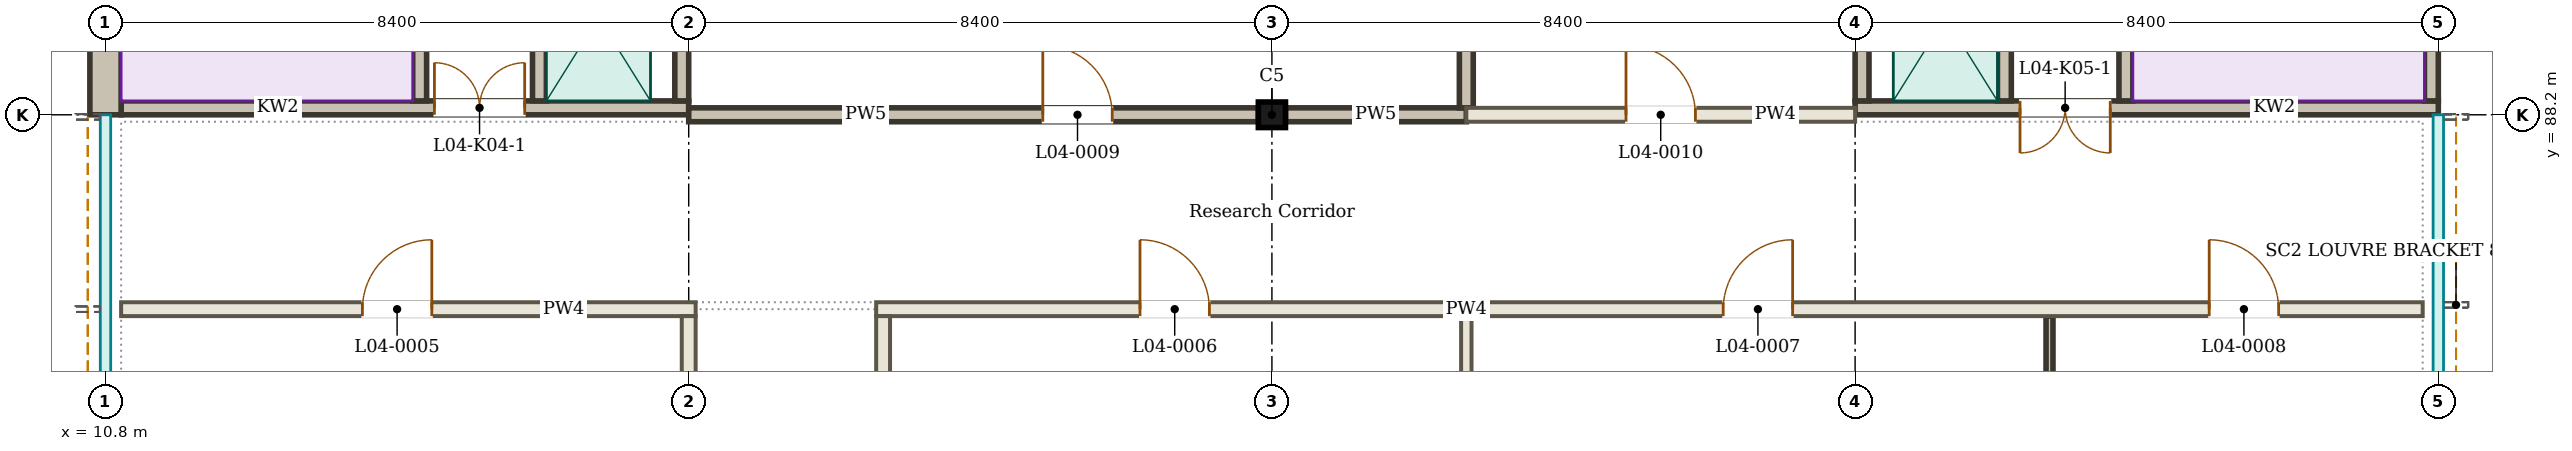
"""IFC4 building model, lengths in metres.
Left out: names, types, materials, properties, quantities, classifications, styles, units other than length and angle.
Written with IfcOpenShell. Run it as: python <this file> out.ifc"""

import sys

from ifc_helpers import new_model, si_unit, direction, frame, frame_2d, origin, origin_2d, place, context, subcontext, project, spatial, rectangle, i_section, extrude, element, fill, save


model = new_model("IFC4")
c1 = context("Model", 3, precision=1e-05, world=origin(), true_north=direction((0.0, 1.0)))
c2 = subcontext(c1, "Body", "Model", "MODEL_VIEW")
j1 = project(units=[si_unit("LENGTHUNIT", "METRE"), si_unit("PLANEANGLEUNIT", "RADIAN")], contexts=[c1])
p1 = place(None, origin())
s1 = spatial("IfcSite", under=j1, at=p1, CompositionType="ELEMENT")
p2 = place(p1, origin())
s2 = spatial("IfcBuilding", under=s1, at=p2, CompositionType="ELEMENT")
p3 = place(p2, frame((0.0, 0.0, 18.0)))
s3 = spatial("IfcBuildingStorey", under=s2, at=p3, CompositionType="ELEMENT", Elevation=18.0)
p4 = place(p3, frame((27.6, 88.2, 0.0), z_axis=(0.0, 0.0, 1.0), x_axis=(1.0, 0.0, 0.0)))
e1 = element("IfcColumn", 1, at=p4, inside=s3, PredefinedType="COLUMN", context=c2, shape_type="SweptSolid", body=[
    extrude(i_section(OverallWidth=0.391, OverallDepth=0.368, WebThickness=0.015, FlangeThickness=0.024, FilletRadius=0.027, at=origin_2d()), origin(), (0.0, 0.0, 1.0), 4.5),
])
p5 = place(p3, frame((11.025, 85.4, 0.0), z_axis=(0.0, 0.0, 1.0), x_axis=(1.0, 0.0, 0.0)))
e2 = element("IfcWall", 2, at=p5, inside=s3, PredefinedType="PARTITIONING", context=c2, shape_type="SweptSolid", body=[
    extrude(rectangle(XDim=8.275, YDim=0.2, at=frame_2d((4.138, 0.0))), origin(), (0.0, 0.0, 1.0), 3.9),
])
p6 = place(p5, frame((3.475, 0.0, 0.0)))
e3 = element("IfcOpeningElement", 3, at=p6, cuts=e2, PredefinedType="OPENING", context=c2, shape_type="SweptSolid", body=[
    extrude(rectangle(XDim=1.0, YDim=2.1, at=frame_2d((0.5, 1.05))), frame((0.0, 0.11, 0.0), z_axis=(0.0, -1.0, 0.0), x_axis=(1.0, 0.0, 0.0)), (0.0, 0.0, 1.0), 0.22),
])
p7 = place(p3, frame((21.9, 85.4, 0.0), z_axis=(0.0, 0.0, 1.0), x_axis=(1.0, 0.0, 0.0)))
e4 = element("IfcWall", 4, at=p7, inside=s3, PredefinedType="PARTITIONING", context=c2, shape_type="SweptSolid", body=[
    extrude(rectangle(XDim=22.275, YDim=0.2, at=frame_2d((11.138, 0.0))), origin(), (0.0, 0.0, 1.0), 3.9),
])
p8 = place(p7, frame((3.8, 0.0, 0.0)))
e5 = element("IfcOpeningElement", 5, at=p8, cuts=e4, PredefinedType="OPENING", context=c2, shape_type="SweptSolid", body=[
    extrude(rectangle(XDim=1.0, YDim=2.1, at=frame_2d((0.5, 1.05))), frame((0.0, 0.11, 0.0), z_axis=(0.0, -1.0, 0.0), x_axis=(1.0, 0.0, 0.0)), (0.0, 0.0, 1.0), 0.22),
])
p9 = place(p7, frame((12.2, 0.0, 0.0)))
e6 = element("IfcOpeningElement", 6, at=p9, cuts=e4, PredefinedType="OPENING", context=c2, shape_type="SweptSolid", body=[
    extrude(rectangle(XDim=1.0, YDim=2.1, at=frame_2d((0.5, 1.05))), frame((0.0, 0.11, 0.0), z_axis=(0.0, -1.0, 0.0), x_axis=(1.0, 0.0, 0.0)), (0.0, 0.0, 1.0), 0.22),
])
p10 = place(p7, frame((19.2, 0.0, 0.0)))
e7 = element("IfcOpeningElement", 7, at=p10, cuts=e4, PredefinedType="OPENING", context=c2, shape_type="SweptSolid", body=[
    extrude(rectangle(XDim=1.0, YDim=2.1, at=frame_2d((0.5, 1.05))), frame((0.0, 0.11, 0.0), z_axis=(0.0, -1.0, 0.0), x_axis=(1.0, 0.0, 0.0)), (0.0, 0.0, 1.0), 0.22),
])
p11 = place(p3, frame((19.2, 88.2, 0.0), z_axis=(0.0, 0.0, 1.0), x_axis=(1.0, 0.0, 0.0)))
e8 = element("IfcWall", 8, at=p11, inside=s3, PredefinedType="SOLIDWALL", context=c2, shape_type="SweptSolid", body=[
    extrude(rectangle(XDim=8.205, YDim=0.2, at=frame_2d((4.102, 0.0))), origin(), (0.0, 0.0, 1.0), 3.9),
])
p12 = place(p11, frame((5.1, 0.0, 0.0)))
e9 = element("IfcOpeningElement", 9, at=p12, cuts=e8, PredefinedType="OPENING", context=c2, shape_type="SweptSolid", body=[
    extrude(rectangle(XDim=1.0, YDim=2.1, at=frame_2d((0.5, 1.05))), frame((0.0, 0.11, 0.0), z_axis=(0.0, -1.0, 0.0), x_axis=(1.0, 0.0, 0.0)), (0.0, 0.0, 1.0), 0.22),
])
p13 = place(p3, frame((27.795, 88.2, 0.0), z_axis=(0.0, 0.0, 1.0), x_axis=(1.0, 0.0, 0.0)))
e10 = element("IfcWall", 10, at=p13, inside=s3, PredefinedType="SOLIDWALL", context=c2, shape_type="SweptSolid", body=[
    extrude(rectangle(XDim=2.604, YDim=0.2, at=frame_2d((1.302, 0.0))), origin(), (0.0, 0.0, 1.0), 3.9),
])
p14 = place(p3, frame((30.4, 88.2, 0.0), z_axis=(0.0, 0.0, 1.0), x_axis=(1.0, 0.0, 0.0)))
e11 = element("IfcWall", 11, at=p14, inside=s3, PredefinedType="PARTITIONING", context=c2, shape_type="SweptSolid", body=[
    extrude(rectangle(XDim=5.6, YDim=0.2, at=frame_2d((2.8, 0.0))), origin(), (0.0, 0.0, 1.0), 3.9),
])
p15 = place(p14, frame((2.3, 0.0, 0.0)))
e12 = element("IfcOpeningElement", 12, at=p15, cuts=e11, PredefinedType="OPENING", context=c2, shape_type="SweptSolid", body=[
    extrude(rectangle(XDim=1.0, YDim=2.1, at=frame_2d((0.5, 1.05))), frame((0.0, 0.11, 0.0), z_axis=(0.0, -1.0, 0.0), x_axis=(1.0, 0.0, 0.0)), (0.0, 0.0, 1.0), 0.22),
])
p16 = place(p3, frame((19.2, 82.7, 0.0), z_axis=(0.0, 0.0, 1.0), x_axis=(0.0, 1.0, 0.0)))
e13 = element("IfcWall", 13, at=p16, inside=s3, PredefinedType="PARTITIONING", context=c2, shape_type="SweptSolid", body=[
    extrude(rectangle(XDim=2.6, YDim=0.2, at=frame_2d((1.3, 0.0))), origin(), (0.0, 0.0, 1.0), 3.9),
])
p17 = place(p3, frame((22.0, 79.875, 0.0), z_axis=(0.0, 0.0, 1.0), x_axis=(0.0, 1.0, 0.0)))
e14 = element("IfcWall", 14, at=p17, inside=s3, PredefinedType="PARTITIONING", context=c2, shape_type="SweptSolid", body=[
    extrude(rectangle(XDim=5.425, YDim=0.2, at=frame_2d((2.712, 0.0))), origin(), (0.0, 0.0, 1.0), 3.9),
])
p18 = place(p3, frame((30.4, 79.875, 0.0), z_axis=(0.0, 0.0, 1.0), x_axis=(0.0, 1.0, 0.0)))
e15 = element("IfcWall", 15, at=p18, inside=s3, PredefinedType="PARTITIONING", context=c2, shape_type="SweptSolid", body=[
    extrude(rectangle(XDim=5.425, YDim=0.15, at=frame_2d((2.712, 0.0))), origin(), (0.0, 0.0, 1.0), 3.9),
])
p19 = place(p3, frame((30.4, 88.3, 0.0), z_axis=(0.0, 0.0, 1.0), x_axis=(0.0, 1.0, 0.0)))
e16 = element("IfcWall", 16, at=p19, inside=s3, PredefinedType="SOLIDWALL", context=c2, shape_type="SweptSolid", body=[
    extrude(rectangle(XDim=8.075, YDim=0.2, at=frame_2d((4.038, 0.0))), origin(), (0.0, 0.0, 1.0), 3.996),
])
p20 = place(p3, frame((38.8, 79.875, 0.0), z_axis=(0.0, 0.0, 1.0), x_axis=(0.0, 1.0, 0.0)))
e17 = element("IfcWall", 17, at=p20, inside=s3, PredefinedType="SOLIDWALL", context=c2, shape_type="SweptSolid", body=[
    extrude(rectangle(XDim=5.425, YDim=0.1, at=frame_2d((2.712, 0.0))), origin(), (0.0, 0.0, 1.0), 3.9),
])
p21 = place(p3, frame((11.025, 88.3, 0.0), z_axis=(0.0, 0.0, 1.0), x_axis=(1.0, 0.0, 0.0)))
e18 = element("IfcWall", 18, at=p21, inside=s3, PredefinedType="SOLIDWALL", context=c2, shape_type="SweptSolid", body=[
    extrude(rectangle(XDim=8.175, YDim=0.2, at=frame_2d((4.087, 0.0))), origin(), (0.0, 0.0, 1.0), 4.5),
])
p22 = place(p21, frame((4.512, 0.0, 0.0)))
e19 = element("IfcOpeningElement", 19, at=p22, cuts=e18, PredefinedType="OPENING", context=c2, shape_type="SweptSolid", body=[
    extrude(rectangle(XDim=1.3, YDim=2.1, at=frame_2d((0.65, 1.05))), frame((0.0, 0.11, 0.0), z_axis=(0.0, -1.0, 0.0), x_axis=(1.0, 0.0, 0.0)), (0.0, 0.0, 1.0), 0.22),
])
p23 = place(p3, frame((10.8, 88.2, 0.0), z_axis=(0.0, 0.0, 1.0), x_axis=(0.0, 1.0, 0.0)))
e20 = element("IfcWall", 20, at=p23, inside=s3, PredefinedType="SOLIDWALL", context=c2, shape_type="SweptSolid", body=[
    extrude(rectangle(XDim=8.175, YDim=0.45, at=frame_2d((4.087, 0.0))), origin(), (0.0, 0.0, 1.0), 4.5),
])
p24 = place(p3, frame((19.1, 88.4, 0.0), z_axis=(0.0, 0.0, 1.0), x_axis=(0.0, 1.0, 0.0)))
e21 = element("IfcWall", 21, at=p24, inside=s3, PredefinedType="SOLIDWALL", context=c2, shape_type="SweptSolid", body=[
    extrude(rectangle(XDim=7.975, YDim=0.2, at=frame_2d((3.988, 0.0))), origin(), (0.0, 0.0, 1.0), 4.5),
])
p25 = place(p3, frame((15.325, 88.4, 0.0), z_axis=(0.0, 0.0, 1.0), x_axis=(0.0, 1.0, 0.0)))
e22 = element("IfcWall", 22, at=p25, inside=s3, PredefinedType="SOLIDWALL", context=c2, shape_type="SweptSolid", body=[
    extrude(rectangle(XDim=7.975, YDim=0.2, at=frame_2d((3.988, 0.0))), origin(), (0.0, 0.0, 1.0), 4.5),
])
p26 = place(p25, frame((6.538, 0.0, 0.0)))
e23 = element("IfcOpeningElement", 23, at=p26, cuts=e22, PredefinedType="OPENING", context=c2, shape_type="SweptSolid", body=[
    extrude(rectangle(XDim=1.1, YDim=2.1, at=frame_2d((0.55, 1.05))), frame((0.0, 0.11, 0.0), z_axis=(0.0, -1.0, 0.0), x_axis=(1.0, 0.0, 0.0)), (0.0, 0.0, 1.0), 0.22),
])
p27 = place(p3, frame((17.05, 88.4, 0.0), z_axis=(0.0, 0.0, 1.0), x_axis=(0.0, 1.0, 0.0)))
e24 = element("IfcWall", 24, at=p27, inside=s3, PredefinedType="SOLIDWALL", context=c2, shape_type="SweptSolid", body=[
    extrude(rectangle(XDim=2.95, YDim=0.2, at=frame_2d((1.475, 0.0))), origin(), (0.0, 0.0, 1.0), 4.5),
])
p28 = place(p3, frame((44.4, 88.3, 0.0), z_axis=(0.0, 0.0, 1.0), x_axis=(-1.0, 0.0, 0.0)))
e25 = element("IfcWall", 25, at=p28, inside=s3, PredefinedType="SOLIDWALL", context=c2, shape_type="SweptSolid", body=[
    extrude(rectangle(XDim=8.4, YDim=0.2, at=frame_2d((4.2, 0.0))), origin(), (0.0, 0.0, 1.0), 4.5),
])
p29 = place(p28, frame((4.725, 0.0, 0.0)))
e26 = element("IfcOpeningElement", 26, at=p29, cuts=e25, PredefinedType="OPENING", context=c2, shape_type="SweptSolid", body=[
    extrude(rectangle(XDim=1.3, YDim=2.1, at=frame_2d((0.65, 1.05))), frame((0.0, 0.11, 0.0), z_axis=(0.0, -1.0, 0.0), x_axis=(1.0, 0.0, 0.0)), (0.0, 0.0, 1.0), 0.22),
])
for number, where, z_axis, x_axis in (
    (27, (44.3, 88.4, 0.0), (0.0, 0.0, 1.0), (0.0, 1.0, 0.0)),
    (28, (36.1, 88.4, 0.0), (0.0, 0.0, 1.0), (0.0, 1.0, 0.0)),
):
    element("IfcWall", number, at=place(p3, frame(where, z_axis=z_axis, x_axis=x_axis)), inside=s3, PredefinedType="SOLIDWALL", context=c2, shape_type="SweptSolid", body=[
        extrude(rectangle(XDim=7.975, YDim=0.2, at=frame_2d((3.988, 0.0))), origin(), (0.0, 0.0, 1.0), 4.5),
    ])
p30 = place(p3, frame((39.9, 88.4, 0.0), z_axis=(0.0, 0.0, 1.0), x_axis=(0.0, 1.0, 0.0)))
e29 = element("IfcWall", 29, at=p30, inside=s3, PredefinedType="SOLIDWALL", context=c2, shape_type="SweptSolid", body=[
    extrude(rectangle(XDim=7.975, YDim=0.2, at=frame_2d((3.988, 0.0))), origin(), (0.0, 0.0, 1.0), 4.5),
])
p31 = place(p30, frame((6.538, 0.0, 0.0)))
e30 = element("IfcOpeningElement", 30, at=p31, cuts=e29, PredefinedType="OPENING", context=c2, shape_type="SweptSolid", body=[
    extrude(rectangle(XDim=1.1, YDim=2.1, at=frame_2d((0.55, 1.05))), frame((0.0, 0.11, 0.0), z_axis=(0.0, -1.0, 0.0), x_axis=(1.0, 0.0, 0.0)), (0.0, 0.0, 1.0), 0.22),
])
p32 = place(p3, frame((38.15, 88.4, 0.0), z_axis=(0.0, 0.0, 1.0), x_axis=(0.0, 1.0, 0.0)))
e31 = element("IfcWall", 31, at=p32, inside=s3, PredefinedType="SOLIDWALL", context=c2, shape_type="SweptSolid", body=[
    extrude(rectangle(XDim=2.95, YDim=0.2, at=frame_2d((1.475, 0.0))), origin(), (0.0, 0.0, 1.0), 4.5),
])
p33 = place(p6, origin())
e32 = element("IfcDoor", 32, at=p33, inside=s3, OperationType="SINGLE_SWING_RIGHT", PredefinedType="DOOR", context=c2, shape_type="SweptSolid", body=[
    extrude(rectangle(XDim=1.0, YDim=2.1, at=frame_2d((0.5, 1.05))), frame((0.0, 0.025, 0.0), z_axis=(0.0, -1.0, 0.0), x_axis=(1.0, 0.0, 0.0)), (0.0, 0.0, 1.0), 0.05),
])
fill(e3, e32)
p34 = place(p8, origin())
e33 = element("IfcDoor", 33, at=p34, inside=s3, OperationType="SINGLE_SWING_LEFT", PredefinedType="DOOR", context=c2, shape_type="SweptSolid", body=[
    extrude(rectangle(XDim=1.0, YDim=2.1, at=frame_2d((0.5, 1.05))), frame((0.0, 0.025, 0.0), z_axis=(0.0, -1.0, 0.0), x_axis=(1.0, 0.0, 0.0)), (0.0, 0.0, 1.0), 0.05),
])
fill(e5, e33)
p35 = place(p9, origin())
e34 = element("IfcDoor", 34, at=p35, inside=s3, OperationType="SINGLE_SWING_RIGHT", PredefinedType="DOOR", context=c2, shape_type="SweptSolid", body=[
    extrude(rectangle(XDim=1.0, YDim=2.1, at=frame_2d((0.5, 1.05))), frame((0.0, 0.025, 0.0), z_axis=(0.0, -1.0, 0.0), x_axis=(1.0, 0.0, 0.0)), (0.0, 0.0, 1.0), 0.05),
])
fill(e6, e34)
p36 = place(p10, origin())
e35 = element("IfcDoor", 35, at=p36, inside=s3, OperationType="SINGLE_SWING_LEFT", PredefinedType="DOOR", context=c2, shape_type="SweptSolid", body=[
    extrude(rectangle(XDim=1.0, YDim=2.1, at=frame_2d((0.5, 1.05))), frame((0.0, 0.025, 0.0), z_axis=(0.0, -1.0, 0.0), x_axis=(1.0, 0.0, 0.0)), (0.0, 0.0, 1.0), 0.05),
])
fill(e7, e35)
p37 = place(p12, origin())
e36 = element("IfcDoor", 36, at=p37, inside=s3, OperationType="SINGLE_SWING_LEFT", PredefinedType="DOOR", context=c2, shape_type="SweptSolid", body=[
    extrude(rectangle(XDim=1.0, YDim=2.1, at=frame_2d((0.5, 1.05))), frame((0.0, 0.025, 0.0), z_axis=(0.0, -1.0, 0.0), x_axis=(1.0, 0.0, 0.0)), (0.0, 0.0, 1.0), 0.05),
])
fill(e9, e36)
p38 = place(p15, origin())
e37 = element("IfcDoor", 37, at=p38, inside=s3, OperationType="SINGLE_SWING_LEFT", PredefinedType="DOOR", context=c2, shape_type="SweptSolid", body=[
    extrude(rectangle(XDim=1.0, YDim=2.1, at=frame_2d((0.5, 1.05))), frame((0.0, 0.025, 0.0), z_axis=(0.0, -1.0, 0.0), x_axis=(1.0, 0.0, 0.0)), (0.0, 0.0, 1.0), 0.05),
])
fill(e12, e37)
p39 = place(p22, origin())
e38 = element("IfcDoor", 38, at=p39, inside=s3, OperationType="DOUBLE_DOOR_DOUBLE_SWING", PredefinedType="DOOR", context=c2, shape_type="SweptSolid", body=[
    extrude(rectangle(XDim=1.3, YDim=2.1, at=frame_2d((0.65, 1.05))), frame((0.0, 0.025, 0.0), z_axis=(0.0, -1.0, 0.0), x_axis=(1.0, 0.0, 0.0)), (0.0, 0.0, 1.0), 0.05),
])
fill(e19, e38)
p40 = place(p29, origin())
e39 = element("IfcDoor", 39, at=p40, inside=s3, OperationType="DOUBLE_DOOR_DOUBLE_SWING", PredefinedType="DOOR", context=c2, shape_type="SweptSolid", body=[
    extrude(rectangle(XDim=1.3, YDim=2.1, at=frame_2d((0.65, 1.05))), frame((0.0, 0.025, 0.0), z_axis=(0.0, -1.0, 0.0), x_axis=(1.0, 0.0, 0.0)), (0.0, 0.0, 1.0), 0.05),
])
fill(e26, e39)
save(model, sys.argv[1])
